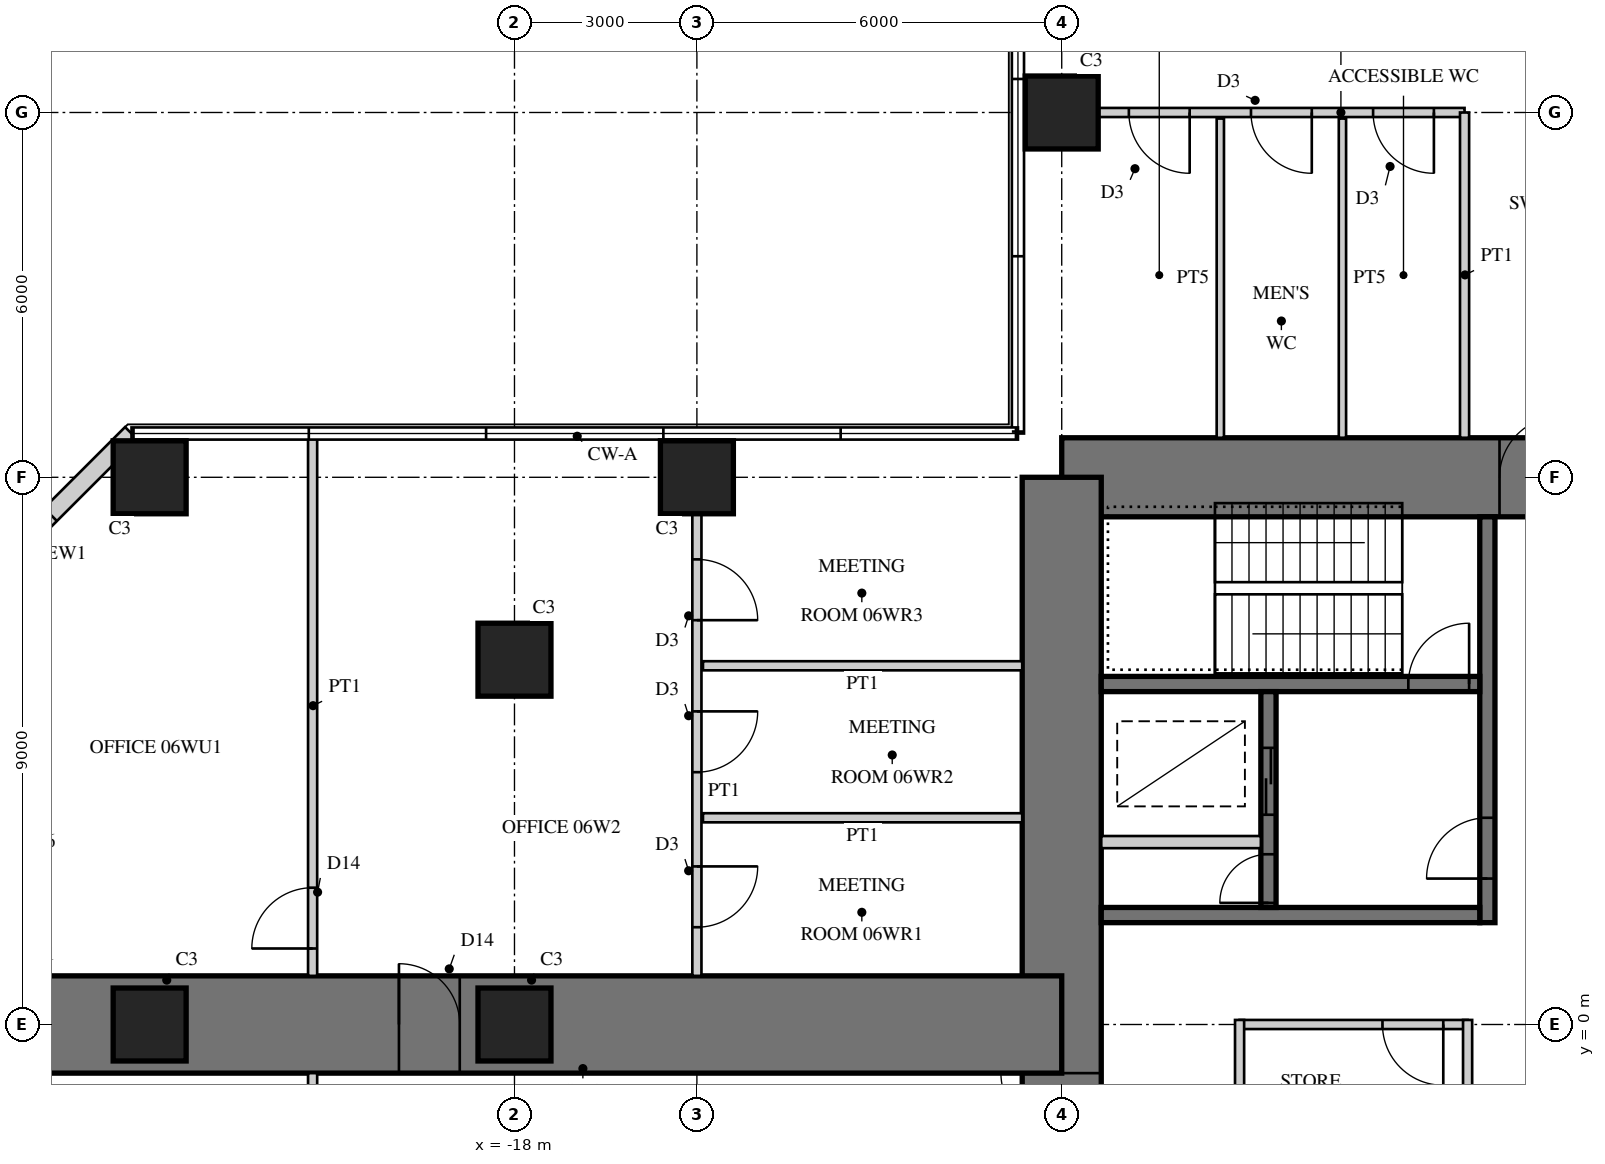
"""IFC4 building model, lengths in metres.
Left out: names, types, materials, properties, quantities, classifications, styles, units other than length and angle.
Written with IfcOpenShell. Run it as: python <this file> out.ifc"""

import sys

from ifc_helpers import new_model, si_unit, direction, frame, frame_2d, origin, origin_2d, place, context, subcontext, project, spatial, rectangle, extrude, element, fill, save


model = new_model("IFC4")
c1 = context("Model", 3, precision=1e-05, world=origin(), true_north=direction((0.0, 1.0)))
c2 = subcontext(c1, "Body", "Model", "MODEL_VIEW")
j1 = project(units=[si_unit("LENGTHUNIT", "METRE"), si_unit("PLANEANGLEUNIT", "RADIAN")], contexts=[c1])
p1 = place(None, origin())
s1 = spatial("IfcSite", under=j1, at=p1, CompositionType="ELEMENT")
p2 = place(p1, origin())
s2 = spatial("IfcBuilding", under=s1, at=p2, CompositionType="ELEMENT")
p3 = place(p2, frame((0.0, 0.0, 27.5)))
s3 = spatial("IfcBuildingStorey", under=s2, at=p3, CompositionType="ELEMENT", Elevation=27.5)
p4 = place(p3, frame((9.0, 9.0, 0.0), z_axis=(0.0, 0.0, 1.0), x_axis=(-1.0, 0.0, 0.0)))
e1 = element("IfcWall", 1, at=p4, inside=s3, PredefinedType="SHEAR", context=c2, shape_type="SweptSolid", body=[
    extrude(rectangle(XDim=18.0, YDim=1.3, at=frame_2d((9.0, 0.0))), origin(), (0.0, 0.0, 1.0), 4.0),
])
p5 = place(p4, frame((9.8, 0.0, 0.0)))
e2 = element("IfcOpeningElement", 2, at=p5, cuts=e1, PredefinedType="OPENING", context=c2, shape_type="SweptSolid", body=[
    extrude(rectangle(XDim=1.0, YDim=2.4, at=frame_2d((0.5, 1.2))), frame((0.0, 0.66, 0.0), z_axis=(0.0, -1.0, 0.0), x_axis=(1.0, 0.0, 0.0)), (0.0, 0.0, 1.0), 1.32),
])
p6 = place(p3, frame((-9.0, 9.0, 0.0), z_axis=(0.0, 0.0, 1.0), x_axis=(0.0, -1.0, 0.0)))
e3 = element("IfcWall", 3, at=p6, inside=s3, PredefinedType="SHEAR", context=c2, shape_type="SweptSolid", body=[
    extrude(rectangle(XDim=18.0, YDim=1.3, at=frame_2d((9.0, 0.0))), origin(), (0.0, 0.0, 1.0), 4.0),
])
p7 = place(p6, frame((9.8, 0.0, 0.0)))
e4 = element("IfcOpeningElement", 4, at=p7, cuts=e3, PredefinedType="OPENING", context=c2, shape_type="SweptSolid", body=[
    extrude(rectangle(XDim=1.0, YDim=2.4, at=frame_2d((0.5, 1.2))), frame((0.0, 0.66, 0.0), z_axis=(0.0, -1.0, 0.0), x_axis=(1.0, 0.0, 0.0)), (0.0, 0.0, 1.0), 1.32),
])
p8 = place(p3, frame((-2.0, 1.675, 0.0), z_axis=(0.0, 0.0, 1.0), x_axis=(0.0, 1.0, 0.0)))
e5 = element("IfcWall", 5, at=p8, inside=s3, PredefinedType="SHEAR", context=c2, shape_type="SweptSolid", body=[
    extrude(rectangle(XDim=6.675, YDim=0.25, at=frame_2d((3.337, 0.0))), origin(), (0.0, 0.0, 1.0), 4.0),
])
p9 = place(p8, frame((0.725, 0.0, 0.0)))
e6 = element("IfcOpeningElement", 6, at=p9, cuts=e5, PredefinedType="OPENING", context=c2, shape_type="SweptSolid", body=[
    extrude(rectangle(XDim=1.0, YDim=2.1, at=frame_2d((0.5, 1.05))), frame((0.0, 0.135, 0.0), z_axis=(0.0, -1.0, 0.0), x_axis=(1.0, 0.0, 0.0)), (0.0, 0.0, 1.0), 0.27),
])
p10 = place(p3, frame((-2.125, 1.8, 0.0), z_axis=(0.0, 0.0, 1.0), x_axis=(-1.0, 0.0, 0.0)))
e7 = element("IfcWall", 7, at=p10, inside=s3, PredefinedType="SHEAR", context=c2, shape_type="SweptSolid", body=[
    extrude(rectangle(XDim=6.225, YDim=0.25, at=frame_2d((3.113, 0.0))), origin(), (0.0, 0.0, 1.0), 4.0),
])
p11 = place(p3, frame((-2.125, 5.6, 0.0), z_axis=(0.0, 0.0, 1.0), x_axis=(-1.0, 0.0, 0.0)))
e8 = element("IfcWall", 8, at=p11, inside=s3, PredefinedType="SHEAR", context=c2, shape_type="SweptSolid", body=[
    extrude(rectangle(XDim=6.225, YDim=0.25, at=frame_2d((3.113, 0.0))), origin(), (0.0, 0.0, 1.0), 4.0),
])
p12 = place(p11, frame((0.175, 0.0, 0.0)))
e9 = element("IfcOpeningElement", 9, at=p12, cuts=e8, PredefinedType="OPENING", context=c2, shape_type="SweptSolid", body=[
    extrude(rectangle(XDim=1.0, YDim=2.1, at=frame_2d((0.5, 1.05))), frame((0.0, 0.135, 0.0), z_axis=(0.0, -1.0, 0.0), x_axis=(1.0, 0.0, 0.0)), (0.0, 0.0, 1.0), 0.27),
])
p13 = place(p3, frame((-5.6, 1.925, 0.0), z_axis=(0.0, 0.0, 1.0), x_axis=(0.0, 1.0, 0.0)))
e10 = element("IfcWall", 10, at=p13, inside=s3, PredefinedType="SHEAR", context=c2, shape_type="SweptSolid", body=[
    extrude(rectangle(XDim=3.55, YDim=0.25, at=frame_2d((1.775, 0.0))), origin(), (0.0, 0.0, 1.0), 4.0),
])
p14 = place(p13, frame((1.525, 0.0, 0.0)))
e11 = element("IfcOpeningElement", 11, at=p14, cuts=e10, PredefinedType="OPENING", context=c2, shape_type="SweptSolid", body=[
    extrude(rectangle(XDim=1.1, YDim=2.2, at=frame_2d((0.55, 1.1))), frame((0.0, 0.135, 0.0), z_axis=(0.0, -1.0, 0.0), x_axis=(1.0, 0.0, 0.0)), (0.0, 0.0, 1.0), 0.27),
])
p15 = place(p13, frame((0.075, 0.0, 0.0)))
e12 = element("IfcOpeningElement", 12, at=p15, cuts=e10, PredefinedType="OPENING", context=c2, shape_type="SweptSolid", body=[
    extrude(rectangle(XDim=0.8, YDim=2.1, at=frame_2d((0.4, 1.05))), frame((0.0, 0.135, 0.0), z_axis=(0.0, -1.0, 0.0), x_axis=(1.0, 0.0, 0.0)), (0.0, 0.0, 1.0), 0.27),
])
p16 = place(p3, frame((-5.725, 3.0, 0.0), z_axis=(0.0, 0.0, 1.0), x_axis=(-1.0, 0.0, 0.0)))
e13 = element("IfcWall", 13, at=p16, inside=s3, PredefinedType="PARTITIONING", context=c2, shape_type="SweptSolid", body=[
    extrude(rectangle(XDim=2.625, YDim=0.2, at=frame_2d((1.312, 0.0))), origin(), (0.0, 0.0, 1.0), 4.0),
])
p17 = place(p3, frame((-9.0, 0.0, 0.0), z_axis=(0.0, 0.0, 1.0), x_axis=(-1.0, 0.0, 0.0)))
e14 = element("IfcWall", 14, at=p17, inside=s3, PredefinedType="SHEAR", context=c2, shape_type="SweptSolid", body=[
    extrude(rectangle(XDim=18.0, YDim=1.6, at=frame_2d((9.0, 0.0))), origin(), (0.0, 0.0, 1.0), 4.0),
])
p18 = place(p17, frame((9.9, 0.0, 0.0)))
e15 = element("IfcOpeningElement", 15, at=p18, cuts=e14, PredefinedType="OPENING", context=c2, shape_type="SweptSolid", body=[
    extrude(rectangle(XDim=1.0, YDim=2.2, at=frame_2d((0.5, 1.1))), frame((0.0, 0.81, 0.0), z_axis=(0.0, -1.0, 0.0), x_axis=(1.0, 0.0, 0.0)), (0.0, 0.0, 1.0), 1.62),
])
for number, where, z_axis, x_axis in (
    (16, (-9.0, 15.0, 0.0), (0.0, 0.0, 1.0), (1.0, 0.0, 0.0)),
    (17, (-15.0, 9.0, 0.0), (0.0, 0.0, 1.0), (1.0, 0.0, 0.0)),
    (18, (-24.0, 9.0, 0.0), (0.0, 0.0, 1.0), (1.0, 0.0, 0.0)),
    (19, (-18.0, 6.0, 0.0), (0.0, 0.0, 1.0), (1.0, 0.0, 0.0)),
    (20, (-18.0, 0.0, 0.0), (0.0, 0.0, 1.0), (1.0, 0.0, 0.0)),
    (21, (-24.0, 0.0, 0.0), (0.0, 0.0, 1.0), (1.0, 0.0, 0.0)),
):
    element("IfcColumn", number, at=place(p3, frame(where, z_axis=z_axis, x_axis=x_axis)), inside=s3, PredefinedType="COLUMN", context=c2, shape_type="SweptSolid", body=[
        extrude(rectangle(XDim=1.2, YDim=1.2, at=origin_2d()), origin(), (0.0, 0.0, 1.0), 4.0),
    ])
p19 = place(p3, frame((-24.298, 9.72, 0.0), z_axis=(0.0, 0.0, 1.0), x_axis=(-0.707106781187, -0.707106781187, 0.0)))
e22 = element("IfcWall", 22, at=p19, inside=s3, PredefinedType="SOLIDWALL", context=c2, shape_type="SweptSolid", body=[
    extrude(rectangle(XDim=4.669, YDim=0.3, at=frame_2d((2.335, 0.0))), origin(), (0.0, 0.0, 1.0), 3.8),
])
p20 = place(p19, frame((1.885, 0.0, 0.3)))
e23 = element("IfcOpeningElement", 23, at=p20, cuts=e22, PredefinedType="OPENING", context=c2, shape_type="SweptSolid", body=[
    extrude(rectangle(XDim=0.9, YDim=2.4, at=frame_2d((0.45, 1.2))), frame((0.0, 0.16, 0.0), z_axis=(0.0, -1.0, 0.0), x_axis=(1.0, 0.0, 0.0)), (0.0, 0.0, 1.0), 0.32),
])
p21 = place(p3, frame((-2.325, 0.0, 0.0), z_axis=(0.0, 0.0, 1.0), x_axis=(-1.0, 0.0, 0.0)))
e24 = element("IfcWall", 24, at=p21, inside=s3, PredefinedType="PARTITIONING", context=c2, shape_type="SweptSolid", body=[
    extrude(rectangle(XDim=3.75, YDim=0.15, at=frame_2d((1.875, 0.0))), origin(), (0.0, 0.0, 1.0), 3.8),
])
p22 = place(p21, frame((0.4, 0.0, 0.0)))
e25 = element("IfcOpeningElement", 25, at=p22, cuts=e24, PredefinedType="OPENING", context=c2, shape_type="SweptSolid", body=[
    extrude(rectangle(XDim=1.0, YDim=2.1, at=frame_2d((0.5, 1.05))), frame((0.0, 0.085, 0.0), z_axis=(0.0, -1.0, 0.0), x_axis=(1.0, 0.0, 0.0)), (0.0, 0.0, 1.0), 0.17),
])
for number, where, z_axis, x_axis in (
    (26, (-2.325, -1.875, 0.0), (0.0, 0.0, 1.0), (0.0, 1.0, 0.0)),
    (27, (-6.075, 0.075, 0.0), (0.0, 0.0, 1.0), (0.0, -1.0, 0.0)),
):
    element("IfcWall", number, at=place(p3, frame(where, z_axis=z_axis, x_axis=x_axis)), inside=s3, PredefinedType="PARTITIONING", context=c2, shape_type="SweptSolid", body=[
        extrude(rectangle(XDim=1.95, YDim=0.15, at=frame_2d((0.975, 0.0))), origin(), (0.0, 0.0, 1.0), 3.8),
    ])
p23 = place(p3, frame((-2.375, 15.0, 0.0), z_axis=(0.0, 0.0, 1.0), x_axis=(-1.0, 0.0, 0.0)))
e28 = element("IfcWall", 28, at=p23, inside=s3, PredefinedType="PARTITIONING", context=c2, shape_type="SweptSolid", body=[
    extrude(rectangle(XDim=6.025, YDim=0.15, at=frame_2d((3.012, 0.0))), origin(), (0.0, 0.0, 1.0), 2.95),
])
p24 = place(p23, frame((0.504, 0.0, 0.0)))
e29 = element("IfcOpeningElement", 29, at=p24, cuts=e28, PredefinedType="OPENING", context=c2, shape_type="SweptSolid", body=[
    extrude(rectangle(XDim=1.0, YDim=2.1, at=frame_2d((0.5, 1.05))), frame((0.0, 0.085, 0.0), z_axis=(0.0, -1.0, 0.0), x_axis=(1.0, 0.0, 0.0)), (0.0, 0.0, 1.0), 0.17),
])
p25 = place(p23, frame((2.512, 0.0, 0.0)))
e30 = element("IfcOpeningElement", 30, at=p25, cuts=e28, PredefinedType="OPENING", context=c2, shape_type="SweptSolid", body=[
    extrude(rectangle(XDim=1.0, YDim=2.1, at=frame_2d((0.5, 1.05))), frame((0.0, 0.085, 0.0), z_axis=(0.0, -1.0, 0.0), x_axis=(1.0, 0.0, 0.0)), (0.0, 0.0, 1.0), 0.17),
])
p26 = place(p23, frame((4.521, 0.0, 0.0)))
e31 = element("IfcOpeningElement", 31, at=p26, cuts=e28, PredefinedType="OPENING", context=c2, shape_type="SweptSolid", body=[
    extrude(rectangle(XDim=1.0, YDim=2.1, at=frame_2d((0.5, 1.05))), frame((0.0, 0.085, 0.0), z_axis=(0.0, -1.0, 0.0), x_axis=(1.0, 0.0, 0.0)), (0.0, 0.0, 1.0), 0.17),
])
p27 = place(p3, frame((-2.375, 9.65, 0.0), z_axis=(0.0, 0.0, 1.0), x_axis=(0.0, 1.0, 0.0)))
e32 = element("IfcWall", 32, at=p27, inside=s3, PredefinedType="PARTITIONING", context=c2, shape_type="SweptSolid", body=[
    extrude(rectangle(XDim=5.35, YDim=0.15, at=frame_2d((2.675, 0.0))), origin(), (0.0, 0.0, 1.0), 3.8),
])
for number, where, z_axis, x_axis in (
    (33, (-4.383, 9.65, 0.0), (0.0, 0.0, 1.0), (0.0, 1.0, 0.0)),
    (34, (-6.392, 9.65, 0.0), (0.0, 0.0, 1.0), (0.0, 1.0, 0.0)),
):
    element("IfcWall", number, at=place(p3, frame(where, z_axis=z_axis, x_axis=x_axis)), inside=s3, PredefinedType="PLUMBINGWALL", context=c2, shape_type="SweptSolid", body=[
        extrude(rectangle(XDim=5.25, YDim=0.12, at=frame_2d((2.625, 0.0))), origin(), (0.0, 0.0, 1.0), 3.8),
    ])
p28 = place(p3, frame((-15.0, 8.4, 0.0), z_axis=(0.0, 0.0, 1.0), x_axis=(0.0, -1.0, 0.0)))
e35 = element("IfcWall", 35, at=p28, inside=s3, PredefinedType="PARTITIONING", context=c2, shape_type="SweptSolid", body=[
    extrude(rectangle(XDim=7.6, YDim=0.15, at=frame_2d((3.8, 0.0))), origin(), (0.0, 0.0, 1.0), 2.95),
])
p29 = place(p28, frame((0.75, 0.0, 0.0)))
e36 = element("IfcOpeningElement", 36, at=p29, cuts=e35, PredefinedType="OPENING", context=c2, shape_type="SweptSolid", body=[
    extrude(rectangle(XDim=1.0, YDim=2.1, at=frame_2d((0.5, 1.05))), frame((0.0, 0.085, 0.0), z_axis=(0.0, -1.0, 0.0), x_axis=(1.0, 0.0, 0.0)), (0.0, 0.0, 1.0), 0.17),
])
p30 = place(p28, frame((3.25, 0.0, 0.0)))
e37 = element("IfcOpeningElement", 37, at=p30, cuts=e35, PredefinedType="OPENING", context=c2, shape_type="SweptSolid", body=[
    extrude(rectangle(XDim=1.0, YDim=2.1, at=frame_2d((0.5, 1.05))), frame((0.0, 0.085, 0.0), z_axis=(0.0, -1.0, 0.0), x_axis=(1.0, 0.0, 0.0)), (0.0, 0.0, 1.0), 0.17),
])
p31 = place(p28, frame((5.8, 0.0, 0.0)))
e38 = element("IfcOpeningElement", 38, at=p31, cuts=e35, PredefinedType="OPENING", context=c2, shape_type="SweptSolid", body=[
    extrude(rectangle(XDim=1.0, YDim=2.1, at=frame_2d((0.5, 1.05))), frame((0.0, 0.085, 0.0), z_axis=(0.0, -1.0, 0.0), x_axis=(1.0, 0.0, 0.0)), (0.0, 0.0, 1.0), 0.17),
])
p32 = place(p3, frame((-9.65, 3.4, 0.0), z_axis=(0.0, 0.0, 1.0), x_axis=(-1.0, 0.0, 0.0)))
e39 = element("IfcWall", 39, at=p32, inside=s3, PredefinedType="PARTITIONING", context=c2, shape_type="SweptSolid", body=[
    extrude(rectangle(XDim=5.25, YDim=0.15, at=frame_2d((2.625, 0.0))), origin(), (0.0, 0.0, 1.0), 3.8),
])
p33 = place(p3, frame((-9.65, 5.9, 0.0), z_axis=(0.0, 0.0, 1.0), x_axis=(-1.0, 0.0, 0.0)))
e40 = element("IfcWall", 40, at=p33, inside=s3, PredefinedType="PARTITIONING", context=c2, shape_type="SweptSolid", body=[
    extrude(rectangle(XDim=5.25, YDim=0.15, at=frame_2d((2.625, 0.0))), origin(), (0.0, 0.0, 1.0), 3.0),
])
p34 = place(p3, frame((-21.32, -0.8, 0.0), z_axis=(0.0, 0.0, 1.0), x_axis=(0.0, -1.0, 0.0)))
e41 = element("IfcWall", 41, at=p34, inside=s3, PredefinedType="PARTITIONING", context=c2, shape_type="SweptSolid", body=[
    extrude(rectangle(XDim=8.88, YDim=0.15, at=frame_2d((4.44, 0.0))), origin(), (0.0, 0.0, 1.0), 3.8),
])
p35 = place(p34, frame((0.45, 0.0, 0.0)))
e42 = element("IfcOpeningElement", 42, at=p35, cuts=e41, PredefinedType="OPENING", context=c2, shape_type="SweptSolid", body=[
    extrude(rectangle(XDim=1.0, YDim=2.2, at=frame_2d((0.5, 1.1))), frame((0.0, 0.085, 0.0), z_axis=(0.0, -1.0, 0.0), x_axis=(1.0, 0.0, 0.0)), (0.0, 0.0, 1.0), 0.17),
])
p36 = place(p3, frame((-21.32, 9.68, 0.0), z_axis=(0.0, 0.0, 1.0), x_axis=(0.0, -1.0, 0.0)))
e43 = element("IfcWall", 43, at=p36, inside=s3, PredefinedType="PARTITIONING", context=c2, shape_type="SweptSolid", body=[
    extrude(rectangle(XDim=8.88, YDim=0.15, at=frame_2d((4.44, 0.0))), origin(), (0.0, 0.0, 1.0), 3.8),
])
p37 = place(p36, frame((7.43, 0.0, 0.0)))
e44 = element("IfcOpeningElement", 44, at=p37, cuts=e43, PredefinedType="OPENING", context=c2, shape_type="SweptSolid", body=[
    extrude(rectangle(XDim=1.0, YDim=2.2, at=frame_2d((0.5, 1.1))), frame((0.0, 0.085, 0.0), z_axis=(0.0, -1.0, 0.0), x_axis=(1.0, 0.0, 0.0)), (0.0, 0.0, 1.0), 0.17),
])
p38 = place(p22, origin())
e45 = element("IfcDoor", 45, at=p38, inside=s3, OperationType="SINGLE_SWING_LEFT", PredefinedType="DOOR", context=c2, shape_type="SweptSolid", body=[
    extrude(rectangle(XDim=1.0, YDim=2.1, at=frame_2d((0.5, 1.05))), frame((0.0, 0.025, 0.0), z_axis=(0.0, -1.0, 0.0), x_axis=(1.0, 0.0, 0.0)), (0.0, 0.0, 1.0), 0.05),
])
fill(e25, e45)
p39 = place(p24, origin())
e46 = element("IfcDoor", 46, at=p39, inside=s3, OperationType="SINGLE_SWING_LEFT", PredefinedType="DOOR", context=c2, shape_type="SweptSolid", body=[
    extrude(rectangle(XDim=1.0, YDim=2.1, at=frame_2d((0.5, 1.05))), frame((0.0, 0.025, 0.0), z_axis=(0.0, -1.0, 0.0), x_axis=(1.0, 0.0, 0.0)), (0.0, 0.0, 1.0), 0.05),
])
fill(e29, e46)
p40 = place(p25, origin())
e47 = element("IfcDoor", 47, at=p40, inside=s3, OperationType="SINGLE_SWING_LEFT", PredefinedType="DOOR", context=c2, shape_type="SweptSolid", body=[
    extrude(rectangle(XDim=1.0, YDim=2.1, at=frame_2d((0.5, 1.05))), frame((0.0, 0.025, 0.0), z_axis=(0.0, -1.0, 0.0), x_axis=(1.0, 0.0, 0.0)), (0.0, 0.0, 1.0), 0.05),
])
fill(e30, e47)
p41 = place(p26, origin())
e48 = element("IfcDoor", 48, at=p41, inside=s3, OperationType="SINGLE_SWING_LEFT", PredefinedType="DOOR", context=c2, shape_type="SweptSolid", body=[
    extrude(rectangle(XDim=1.0, YDim=2.1, at=frame_2d((0.5, 1.05))), frame((0.0, 0.025, 0.0), z_axis=(0.0, -1.0, 0.0), x_axis=(1.0, 0.0, 0.0)), (0.0, 0.0, 1.0), 0.05),
])
fill(e31, e48)
p42 = place(p29, origin())
e49 = element("IfcDoor", 49, at=p42, inside=s3, OperationType="SINGLE_SWING_RIGHT", PredefinedType="DOOR", context=c2, shape_type="SweptSolid", body=[
    extrude(rectangle(XDim=1.0, YDim=2.1, at=frame_2d((0.5, 1.05))), frame((0.0, 0.025, 0.0), z_axis=(0.0, -1.0, 0.0), x_axis=(1.0, 0.0, 0.0)), (0.0, 0.0, 1.0), 0.05),
])
fill(e36, e49)
p43 = place(p30, origin())
e50 = element("IfcDoor", 50, at=p43, inside=s3, OperationType="SINGLE_SWING_LEFT", PredefinedType="DOOR", context=c2, shape_type="SweptSolid", body=[
    extrude(rectangle(XDim=1.0, YDim=2.1, at=frame_2d((0.5, 1.05))), frame((0.0, 0.025, 0.0), z_axis=(0.0, -1.0, 0.0), x_axis=(1.0, 0.0, 0.0)), (0.0, 0.0, 1.0), 0.05),
])
fill(e37, e50)
p44 = place(p31, origin())
e51 = element("IfcDoor", 51, at=p44, inside=s3, OperationType="SINGLE_SWING_LEFT", PredefinedType="DOOR", context=c2, shape_type="SweptSolid", body=[
    extrude(rectangle(XDim=1.0, YDim=2.1, at=frame_2d((0.5, 1.05))), frame((0.0, 0.025, 0.0), z_axis=(0.0, -1.0, 0.0), x_axis=(1.0, 0.0, 0.0)), (0.0, 0.0, 1.0), 0.05),
])
fill(e38, e51)
p45 = place(p37, frame((1.0, 0.0, 0.0), z_axis=(0.0, 0.0, 1.0), x_axis=(-1.0, 0.0, 0.0)))
e52 = element("IfcDoor", 52, at=p45, inside=s3, OperationType="SINGLE_SWING_LEFT", PredefinedType="DOOR", context=c2, shape_type="SweptSolid", body=[
    extrude(rectangle(XDim=1.0, YDim=2.2, at=frame_2d((0.5, 1.1))), frame((0.0, 0.025, 0.0), z_axis=(0.0, -1.0, 0.0), x_axis=(1.0, 0.0, 0.0)), (0.0, 0.0, 1.0), 0.05),
])
fill(e44, e52)
p46 = place(p18, frame((1.0, 0.0, 0.0), z_axis=(0.0, 0.0, 1.0), x_axis=(-1.0, 0.0, 0.0)))
e53 = element("IfcDoor", 53, at=p46, inside=s3, OperationType="SINGLE_SWING_LEFT", PredefinedType="DOOR", context=c2, shape_type="SweptSolid", body=[
    extrude(rectangle(XDim=1.0, YDim=2.2, at=frame_2d((0.5, 1.1))), frame((0.0, 0.025, 0.0), z_axis=(0.0, -1.0, 0.0), x_axis=(1.0, 0.0, 0.0)), (0.0, 0.0, 1.0), 0.05),
])
fill(e15, e53)
p47 = place(p5, frame((1.0, 0.0, 0.0), z_axis=(0.0, 0.0, 1.0), x_axis=(-1.0, 0.0, 0.0)))
e54 = element("IfcDoor", 54, at=p47, inside=s3, OperationType="SINGLE_SWING_RIGHT", PredefinedType="DOOR", context=c2, shape_type="SweptSolid", body=[
    extrude(rectangle(XDim=1.0, YDim=2.4, at=frame_2d((0.5, 1.2))), frame((0.0, -0.005, 0.0), z_axis=(0.0, -1.0, 0.0), x_axis=(1.0, 0.0, 0.0)), (0.0, 0.0, 1.0), 0.05),
])
fill(e2, e54)
p48 = place(p7, frame((1.0, 0.0, 0.0), z_axis=(0.0, 0.0, 1.0), x_axis=(-1.0, 0.0, 0.0)))
e55 = element("IfcDoor", 55, at=p48, inside=s3, OperationType="SINGLE_SWING_RIGHT", PredefinedType="DOOR", context=c2, shape_type="SweptSolid", body=[
    extrude(rectangle(XDim=1.0, YDim=2.4, at=frame_2d((0.5, 1.2))), frame((0.0, -0.005, 0.0), z_axis=(0.0, -1.0, 0.0), x_axis=(1.0, 0.0, 0.0)), (0.0, 0.0, 1.0), 0.05),
])
fill(e4, e55)
p49 = place(p9, origin())
e56 = element("IfcDoor", 56, at=p49, inside=s3, OperationType="SINGLE_SWING_LEFT", PredefinedType="DOOR", context=c2, shape_type="SweptSolid", body=[
    extrude(rectangle(XDim=1.0, YDim=2.1, at=frame_2d((0.5, 1.05))), frame((0.0, 0.025, 0.0), z_axis=(0.0, -1.0, 0.0), x_axis=(1.0, 0.0, 0.0)), (0.0, 0.0, 1.0), 0.05),
])
fill(e6, e56)
p50 = place(p12, frame((1.0, 0.0, 0.0), z_axis=(0.0, 0.0, 1.0), x_axis=(-1.0, 0.0, 0.0)))
e57 = element("IfcDoor", 57, at=p50, inside=s3, OperationType="SINGLE_SWING_RIGHT", PredefinedType="DOOR", context=c2, shape_type="SweptSolid", body=[
    extrude(rectangle(XDim=1.0, YDim=2.1, at=frame_2d((0.5, 1.05))), frame((0.0, 0.025, 0.0), z_axis=(0.0, -1.0, 0.0), x_axis=(1.0, 0.0, 0.0)), (0.0, 0.0, 1.0), 0.05),
])
fill(e9, e57)
p51 = place(p14, origin())
e58 = element("IfcDoor", 58, at=p51, inside=s3, OperationType="DOUBLE_DOOR_SLIDING", PredefinedType="DOOR", context=c2, shape_type="SweptSolid", body=[
    extrude(rectangle(XDim=1.1, YDim=2.2, at=frame_2d((0.55, 1.1))), frame((0.0, 0.025, 0.0), z_axis=(0.0, -1.0, 0.0), x_axis=(1.0, 0.0, 0.0)), (0.0, 0.0, 1.0), 0.05),
])
fill(e11, e58)
p52 = place(p15, origin())
e59 = element("IfcDoor", 59, at=p52, inside=s3, OperationType="SINGLE_SWING_LEFT", PredefinedType="DOOR", context=c2, shape_type="SweptSolid", body=[
    extrude(rectangle(XDim=0.8, YDim=2.1, at=frame_2d((0.4, 1.05))), frame((0.0, 0.025, 0.0), z_axis=(0.0, -1.0, 0.0), x_axis=(1.0, 0.0, 0.0)), (0.0, 0.0, 1.0), 0.05),
])
fill(e12, e59)
save(model, sys.argv[1])
